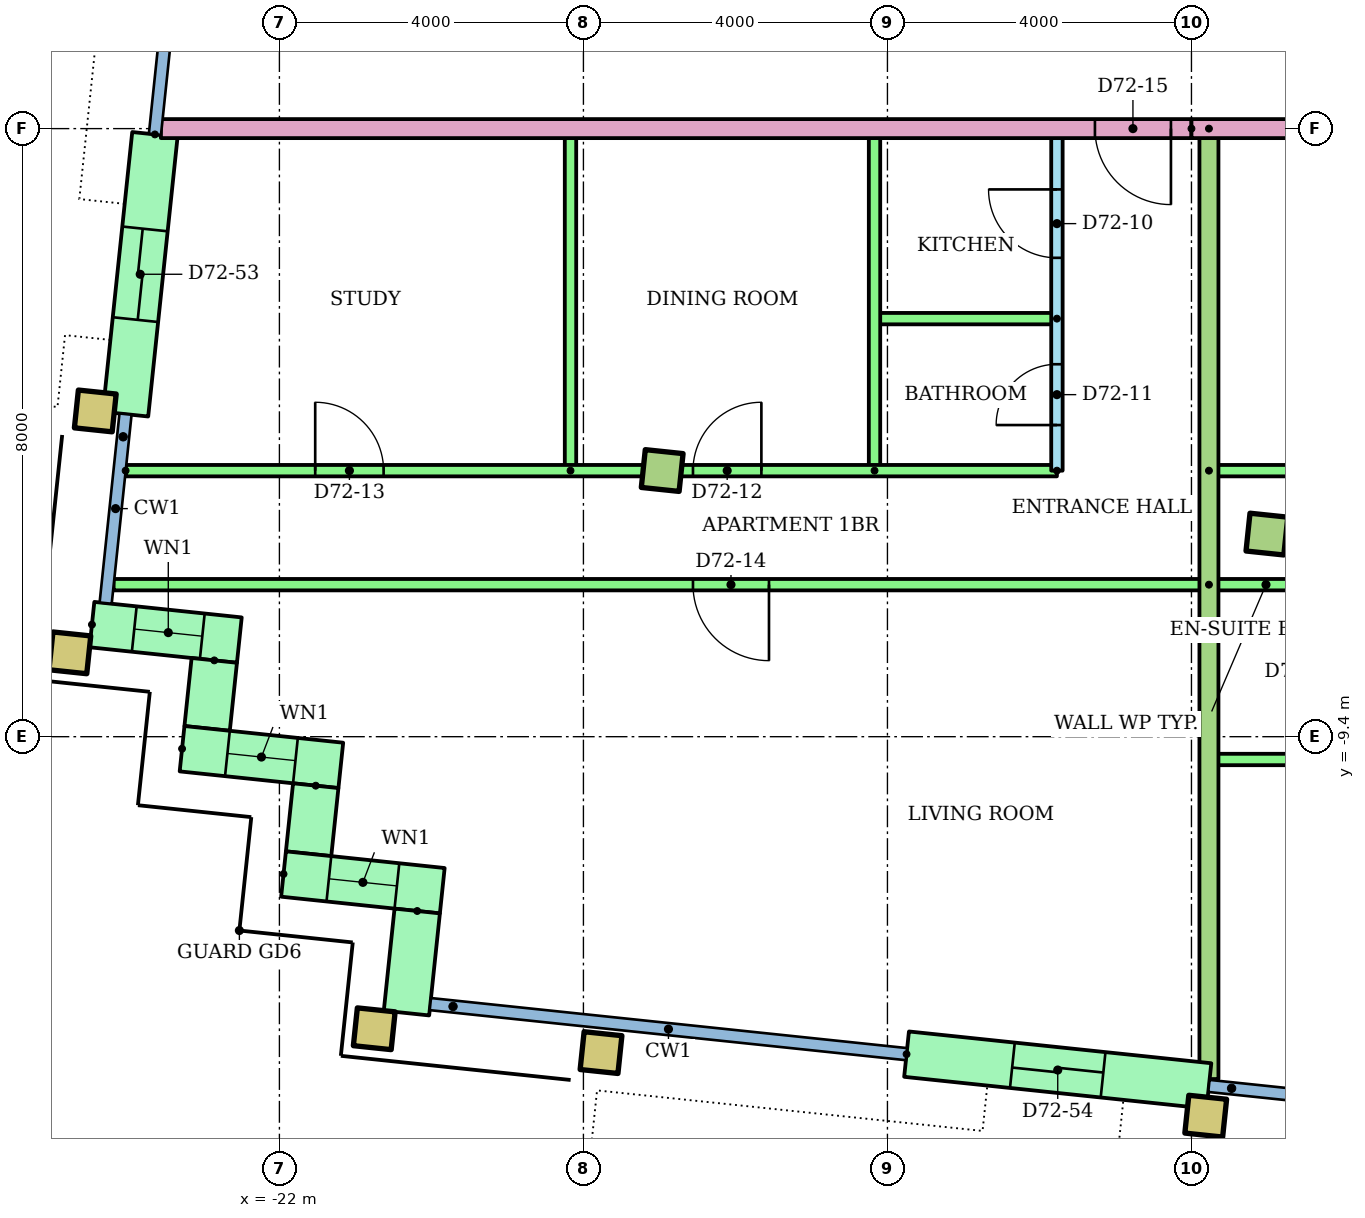
"""IFC4 building model, lengths in metres.
Left out: names, types, materials, properties, quantities, classifications, styles, units other than length and angle.
Written with IfcOpenShell. Run it as: python <this file> out.ifc"""

import sys

from ifc_helpers import new_model, si_unit, direction, frame, frame_2d, origin, origin_2d, place, context, subcontext, project, spatial, rectangle, hollow_rectangle, extrude, element, fill, save


model = new_model("IFC4")
c1 = context("Model", 3, precision=1e-05, world=origin(), true_north=direction((0.0, 1.0)))
c2 = subcontext(c1, "Body", "Model", "MODEL_VIEW")
j1 = project(units=[si_unit("LENGTHUNIT", "METRE"), si_unit("PLANEANGLEUNIT", "RADIAN")], contexts=[c1])
p1 = place(None, origin())
s1 = spatial("IfcSite", under=j1, at=p1, CompositionType="ELEMENT")
p2 = place(p1, origin())
s2 = spatial("IfcBuilding", under=s1, at=p2, CompositionType="ELEMENT")
p3 = place(p2, frame((0.0, 0.0, 275.5)))
s3 = spatial("IfcBuildingStorey", under=s2, at=p3, CompositionType="ELEMENT", Elevation=275.5)
for number, where, z_axis, x_axis in (
    (1, (-20.752, -13.243, 0.0), (0.0, 0.0, 1.0), (0.995, -0.105, 0.0)),
    (2, (-17.768, -13.556, 0.0), (0.0, 0.0, 1.0), (0.995, -0.105, 0.0)),
    (3, (-9.812, -14.392, 0.0), (0.0, 0.0, 1.0), (0.995, -0.105, 0.0)),
    (4, (-24.757, -8.297, 0.0), (0.0, 0.0, 1.0), (0.995, -0.105, 0.0)),
    (5, (-24.423, -5.115, 0.0), (0.0, 0.0, 1.0), (0.995, -0.105, 0.0)),
):
    element("IfcColumn", number, at=place(p3, frame(where, z_axis=z_axis, x_axis=x_axis)), inside=s3, PredefinedType="COLUMN", context=c2, shape_type="SweptSolid", body=[
        extrude(hollow_rectangle(XDim=0.5, YDim=0.5, WallThickness=0.025, at=origin_2d()), origin(), (0.0, 0.0, 1.0), 3.2),
    ])
for number, where, z_axis, x_axis in (
    (6, (-16.964, -5.898, 0.0), (0.0, 0.0, 1.0), (0.995, -0.105, 0.0)),
    (7, (-9.007, -6.735, 0.0), (0.0, 0.0, 1.0), (0.995, -0.105, 0.0)),
):
    element("IfcColumn", number, at=place(p3, frame(where, z_axis=z_axis, x_axis=x_axis)), inside=s3, PredefinedType="COLUMN", context=c2, shape_type="SweptSolid", body=[
        extrude(rectangle(XDim=0.5, YDim=0.5, at=origin_2d()), origin(), (0.0, 0.0, 1.0), 3.2),
    ])
p4 = place(p3, frame((-23.638, -1.476, 0.0), z_axis=(0.0, 0.0, 1.0), x_axis=(-0.104513052986, -0.994523514933, 0.0)))
e8 = element("IfcWall", 8, at=p4, inside=s3, PredefinedType="STANDARD", context=c2, shape_type="SweptSolid", body=[
    extrude(rectangle(XDim=3.7, YDim=0.6, at=frame_2d((1.85, 0.0))), origin(), (0.0, 0.0, 1.0), 2.92),
])
p5 = place(p4, frame((1.25, 0.0, 0.0)))
e9 = element("IfcOpeningElement", 9, at=p5, cuts=e8, PredefinedType="OPENING", context=c2, shape_type="SweptSolid", body=[
    extrude(rectangle(XDim=1.2, YDim=2.1, at=frame_2d((0.6, 1.05))), frame((0.0, 0.31, 0.0), z_axis=(0.0, -1.0, 0.0), x_axis=(1.0, 0.0, 0.0)), (0.0, 0.0, 1.0), 0.62),
])
p6 = place(p3, frame((-24.467, -7.925, 0.0), z_axis=(0.0, 0.0, 1.0), x_axis=(0.994521219184, -0.104534896528, 0.0)))
e10 = element("IfcWall", 10, at=p6, inside=s3, PredefinedType="STANDARD", context=c2, shape_type="SweptSolid", body=[
    extrude(rectangle(XDim=1.95, YDim=0.6, at=frame_2d((0.975, 0.0))), origin(), (0.0, 0.0, 1.0), 2.92),
])
p7 = place(p6, frame((0.56, 0.0, 0.9)))
e11 = element("IfcOpeningElement", 11, at=p7, cuts=e10, PredefinedType="OPENING", context=c2, shape_type="SweptSolid", body=[
    extrude(rectangle(XDim=0.9, YDim=1.5, at=frame_2d((0.45, 0.75))), frame((0.0, 0.31, 0.0), z_axis=(0.0, -1.0, 0.0), x_axis=(1.0, 0.0, 0.0)), (0.0, 0.0, 1.0), 0.62),
])
p8 = place(p3, frame((-22.857, -8.396, 0.0), z_axis=(0.0, 0.0, 1.0), x_axis=(-0.104444712852, -0.994530694326, 0.0)))
e12 = element("IfcWall", 12, at=p8, inside=s3, PredefinedType="STANDARD", context=c2, shape_type="SweptSolid", body=[
    extrude(rectangle(XDim=0.9, YDim=0.6, at=frame_2d((0.45, 0.0))), origin(), (0.0, 0.0, 1.0), 2.92),
])
p9 = place(p3, frame((-23.281, -9.558, 0.0), z_axis=(0.0, 0.0, 1.0), x_axis=(0.994523910136, -0.104509292252, 0.0)))
e13 = element("IfcWall", 13, at=p9, inside=s3, PredefinedType="STANDARD", context=c2, shape_type="SweptSolid", body=[
    extrude(rectangle(XDim=2.1, YDim=0.6, at=frame_2d((1.05, 0.0))), origin(), (0.0, 0.0, 1.0), 2.92),
])
p10 = place(p9, frame((0.6, 0.0, 0.9)))
e14 = element("IfcOpeningElement", 14, at=p10, cuts=e13, PredefinedType="OPENING", context=c2, shape_type="SweptSolid", body=[
    extrude(rectangle(XDim=0.9, YDim=1.5, at=frame_2d((0.45, 0.75))), frame((0.0, 0.31, 0.0), z_axis=(0.0, -1.0, 0.0), x_axis=(1.0, 0.0, 0.0)), (0.0, 0.0, 1.0), 0.62),
])
p11 = place(p3, frame((-21.522, -10.044, 0.0), z_axis=(0.0, 0.0, 1.0), x_axis=(-0.104416541099, -0.994533652495, 0.0)))
e15 = element("IfcWall", 15, at=p11, inside=s3, PredefinedType="STANDARD", context=c2, shape_type="SweptSolid", body=[
    extrude(rectangle(XDim=0.9, YDim=0.6, at=frame_2d((0.45, 0.0))), origin(), (0.0, 0.0, 1.0), 2.92),
])
p12 = place(p3, frame((-21.946, -11.207, 0.0), z_axis=(0.0, 0.0, 1.0), x_axis=(0.994511820899, -0.104624271047, 0.0)))
e16 = element("IfcWall", 16, at=p12, inside=s3, PredefinedType="STANDARD", context=c2, shape_type="SweptSolid", body=[
    extrude(rectangle(XDim=2.1, YDim=0.6, at=frame_2d((1.05, 0.0))), origin(), (0.0, 0.0, 1.0), 2.92),
])
p13 = place(p12, frame((0.6, 0.0, 0.9)))
e17 = element("IfcOpeningElement", 17, at=p13, cuts=e16, PredefinedType="OPENING", context=c2, shape_type="SweptSolid", body=[
    extrude(rectangle(XDim=0.9, YDim=1.5, at=frame_2d((0.45, 0.75))), frame((0.0, 0.31, 0.0), z_axis=(0.0, -1.0, 0.0), x_axis=(1.0, 0.0, 0.0)), (0.0, 0.0, 1.0), 0.62),
])
p14 = place(p3, frame((-20.187, -11.693, 0.0), z_axis=(0.0, 0.0, 1.0), x_axis=(-0.1043365026, -0.994542052517, 0.0)))
e18 = element("IfcWall", 18, at=p14, inside=s3, PredefinedType="STANDARD", context=c2, shape_type="SweptSolid", body=[
    extrude(rectangle(XDim=1.35, YDim=0.6, at=frame_2d((0.675, 0.0))), origin(), (0.0, 0.0, 1.0), 2.92),
])
p15 = place(p3, frame((-13.749, -13.576, 0.0), z_axis=(0.0, 0.0, 1.0), x_axis=(0.994519156568, -0.104554517933, 0.0)))
e19 = element("IfcWall", 19, at=p15, inside=s3, PredefinedType="STANDARD", context=c2, shape_type="SweptSolid", body=[
    extrude(rectangle(XDim=4.0, YDim=0.6, at=frame_2d((2.0, 0.0))), origin(), (0.0, 0.0, 1.0), 2.92),
])
p16 = place(p15, frame((1.4, 0.0, 0.0)))
e20 = element("IfcOpeningElement", 20, at=p16, cuts=e19, PredefinedType="OPENING", context=c2, shape_type="SweptSolid", body=[
    extrude(rectangle(XDim=1.2, YDim=2.1, at=frame_2d((0.6, 1.05))), frame((0.0, 0.31, 0.0), z_axis=(0.0, -1.0, 0.0), x_axis=(1.0, 0.0, 0.0)), (0.0, 0.0, 1.0), 0.62),
])
p17 = place(p3, frame((-11.77, -5.9, 0.0), z_axis=(0.0, 0.0, 1.0), x_axis=(0.0, 1.0, 0.0)))
e21 = element("IfcWall", 21, at=p17, inside=s3, PredefinedType="PARTITIONING", context=c2, shape_type="SweptSolid", body=[
    extrude(rectangle(XDim=4.5, YDim=0.15, at=frame_2d((2.25, 0.0))), origin(), (0.0, 0.0, 1.0), 2.4),
])
p18 = place(p17, frame((2.8, 0.0, 0.0)))
e22 = element("IfcOpeningElement", 22, at=p18, cuts=e21, PredefinedType="OPENING", context=c2, shape_type="SweptSolid", body=[
    extrude(rectangle(XDim=0.9, YDim=2.1, at=frame_2d((0.45, 1.05))), frame((0.0, 0.085, 0.0), z_axis=(0.0, -1.0, 0.0), x_axis=(1.0, 0.0, 0.0)), (0.0, 0.0, 1.0), 0.17),
])
p19 = place(p17, frame((0.6, 0.0, 0.0)))
e23 = element("IfcOpeningElement", 23, at=p19, cuts=e21, PredefinedType="OPENING", context=c2, shape_type="SweptSolid", body=[
    extrude(rectangle(XDim=0.8, YDim=2.1, at=frame_2d((0.4, 1.05))), frame((0.0, 0.085, 0.0), z_axis=(0.0, -1.0, 0.0), x_axis=(1.0, 0.0, 0.0)), (0.0, 0.0, 1.0), 0.17),
])
p20 = place(p3, frame((-11.77, -3.9, 0.0), z_axis=(0.0, 0.0, 1.0), x_axis=(-1.0, 0.0, 0.0)))
e24 = element("IfcWall", 24, at=p20, inside=s3, PredefinedType="PARTITIONING", context=c2, shape_type="SweptSolid", body=[
    extrude(rectangle(XDim=2.4, YDim=0.15, at=frame_2d((1.2, 0.0))), origin(), (0.0, 0.0, 1.0), 2.4),
])
for number, where, z_axis, x_axis in (
    (25, (-14.17, -5.9, 0.0), (0.0, 0.0, 1.0), (0.0, 1.0, 0.0)),
    (26, (-18.17, -5.9, 0.0), (0.0, 0.0, 1.0), (0.0, 1.0, 0.0)),
):
    element("IfcWall", number, at=place(p3, frame(where, z_axis=z_axis, x_axis=x_axis)), inside=s3, PredefinedType="PARTITIONING", context=c2, shape_type="SweptSolid", body=[
        extrude(rectangle(XDim=4.5, YDim=0.15, at=frame_2d((2.25, 0.0))), origin(), (0.0, 0.0, 1.0), 2.4),
    ])
p21 = place(p3, frame((-24.023, -5.9, 0.0)))
e27 = element("IfcWall", 27, at=p21, inside=s3, PredefinedType="PARTITIONING", context=c2, shape_type="SweptSolid", body=[
    extrude(rectangle(XDim=12.253, YDim=0.15, at=frame_2d((6.127, 0.0))), origin(), (0.0, 0.0, 1.0), 2.4),
])
p22 = place(p21, frame((7.465, 0.0, 0.0)))
e28 = element("IfcOpeningElement", 28, at=p22, cuts=e27, PredefinedType="OPENING", context=c2, shape_type="SweptSolid", body=[
    extrude(rectangle(XDim=0.9, YDim=2.1, at=frame_2d((0.45, 1.05))), frame((0.0, 0.085, 0.0), z_axis=(0.0, -1.0, 0.0), x_axis=(1.0, 0.0, 0.0)), (0.0, 0.0, 1.0), 0.17),
])
p23 = place(p21, frame((2.494, 0.0, 0.0)))
e29 = element("IfcOpeningElement", 29, at=p23, cuts=e27, PredefinedType="OPENING", context=c2, shape_type="SweptSolid", body=[
    extrude(rectangle(XDim=0.9, YDim=2.1, at=frame_2d((0.45, 1.05))), frame((0.0, 0.085, 0.0), z_axis=(0.0, -1.0, 0.0), x_axis=(1.0, 0.0, 0.0)), (0.0, 0.0, 1.0), 0.17),
])
p24 = place(p3, frame((-9.77, -7.4, 0.0), z_axis=(0.0, 0.0, 1.0), x_axis=(-1.0, 0.0, 0.0)))
e30 = element("IfcWall", 30, at=p24, inside=s3, PredefinedType="PARTITIONING", context=c2, shape_type="SweptSolid", body=[
    extrude(rectangle(XDim=14.411, YDim=0.15, at=frame_2d((7.206, 0.0))), origin(), (0.0, 0.0, 1.0), 2.4),
])
p25 = place(p24, frame((5.789, 0.0, 0.0)))
e31 = element("IfcOpeningElement", 31, at=p25, cuts=e30, PredefinedType="OPENING", context=c2, shape_type="SweptSolid", body=[
    extrude(rectangle(XDim=1.0, YDim=2.1, at=frame_2d((0.5, 1.05))), frame((0.0, 0.085, 0.0), z_axis=(0.0, -1.0, 0.0), x_axis=(1.0, 0.0, 0.0)), (0.0, 0.0, 1.0), 0.17),
])
p26 = place(p3, frame((-9.77, -5.9, 0.0)))
e32 = element("IfcWall", 32, at=p26, inside=s3, PredefinedType="PARTITIONING", context=c2, shape_type="SweptSolid", body=[
    extrude(rectangle(XDim=13.912, YDim=0.15, at=frame_2d((6.956, 0.0))), origin(), (0.0, 0.0, 1.0), 2.4),
])
p27 = place(p26, frame((9.562, 0.0, 0.0)))
e33 = element("IfcOpeningElement", 33, at=p27, cuts=e32, PredefinedType="OPENING", context=c2, shape_type="SweptSolid", body=[
    extrude(rectangle(XDim=0.9, YDim=2.1, at=frame_2d((0.45, 1.05))), frame((0.0, 0.085, 0.0), z_axis=(0.0, -1.0, 0.0), x_axis=(1.0, 0.0, 0.0)), (0.0, 0.0, 1.0), 0.17),
])
p28 = place(p26, frame((6.187, 0.0, 0.0)))
e34 = element("IfcOpeningElement", 34, at=p28, cuts=e32, PredefinedType="OPENING", context=c2, shape_type="SweptSolid", body=[
    extrude(rectangle(XDim=0.9, YDim=2.1, at=frame_2d((0.45, 1.05))), frame((0.0, 0.085, 0.0), z_axis=(0.0, -1.0, 0.0), x_axis=(1.0, 0.0, 0.0)), (0.0, 0.0, 1.0), 0.17),
])
p29 = place(p26, frame((1.931, 0.0, 0.0)))
e35 = element("IfcOpeningElement", 35, at=p29, cuts=e32, PredefinedType="OPENING", context=c2, shape_type="SweptSolid", body=[
    extrude(rectangle(XDim=0.9, YDim=2.1, at=frame_2d((0.45, 1.05))), frame((0.0, 0.085, 0.0), z_axis=(0.0, -1.0, 0.0), x_axis=(1.0, 0.0, 0.0)), (0.0, 0.0, 1.0), 0.17),
])
p30 = place(p3, frame((6.142, -7.4, 0.0), z_axis=(0.0, 0.0, 1.0), x_axis=(-1.0, 0.0, 0.0)))
e36 = element("IfcWall", 36, at=p30, inside=s3, PredefinedType="PARTITIONING", context=c2, shape_type="SweptSolid", body=[
    extrude(rectangle(XDim=15.912, YDim=0.15, at=frame_2d((7.956, 0.0))), origin(), (0.0, 0.0, 1.0), 2.4),
])
p31 = place(p30, frame((12.252, 0.0, 0.0)))
e37 = element("IfcOpeningElement", 37, at=p31, cuts=e36, PredefinedType="OPENING", context=c2, shape_type="SweptSolid", body=[
    extrude(rectangle(XDim=0.9, YDim=2.1, at=frame_2d((0.45, 1.05))), frame((0.0, 0.085, 0.0), z_axis=(0.0, -1.0, 0.0), x_axis=(1.0, 0.0, 0.0)), (0.0, 0.0, 1.0), 0.17),
])
p32 = place(p30, frame((9.495, 0.0, 0.0)))
e38 = element("IfcOpeningElement", 38, at=p32, cuts=e36, PredefinedType="OPENING", context=c2, shape_type="SweptSolid", body=[
    extrude(rectangle(XDim=0.9, YDim=2.1, at=frame_2d((0.45, 1.05))), frame((0.0, 0.085, 0.0), z_axis=(0.0, -1.0, 0.0), x_axis=(1.0, 0.0, 0.0)), (0.0, 0.0, 1.0), 0.17),
])
p33 = place(p30, frame((3.478, 0.0, 0.0)))
e39 = element("IfcOpeningElement", 39, at=p33, cuts=e36, PredefinedType="OPENING", context=c2, shape_type="SweptSolid", body=[
    extrude(rectangle(XDim=1.0, YDim=2.1, at=frame_2d((0.5, 1.05))), frame((0.0, 0.085, 0.0), z_axis=(0.0, -1.0, 0.0), x_axis=(1.0, 0.0, 0.0)), (0.0, 0.0, 1.0), 0.17),
])
p34 = place(p3, frame((-7.77, -9.7, 0.0), z_axis=(0.0, 0.0, 1.0), x_axis=(-1.0, 0.0, 0.0)))
e40 = element("IfcWall", 40, at=p34, inside=s3, PredefinedType="PARTITIONING", context=c2, shape_type="SweptSolid", body=[
    extrude(rectangle(XDim=2.0, YDim=0.15, at=frame_2d((1.0, 0.0))), origin(), (0.0, 0.0, 1.0), 2.4),
])
p35 = place(p3, frame((-9.77, -1.4, 0.0), z_axis=(0.0, 0.0, 1.0), x_axis=(0.0, -1.0, 0.0)))
e41 = element("IfcWall", 41, at=p35, inside=s3, PredefinedType="PARTITIONING", context=c2, shape_type="SweptSolid", body=[
    extrude(rectangle(XDim=12.504, YDim=0.25, at=frame_2d((6.252, 0.0))), origin(), (0.0, 0.0, 1.0), 2.4),
])
p36 = place(p3, frame((-10.0, -1.4, 0.0), z_axis=(0.0, 0.0, 1.0), x_axis=(-1.0, 0.0, 0.0)))
e42 = element("IfcWall", 42, at=p36, inside=s3, PredefinedType="PARTITIONING", context=c2, shape_type="SweptSolid", body=[
    extrude(rectangle(XDim=13.56, YDim=0.25, at=frame_2d((6.78, 0.0))), origin(), (0.0, 0.0, 1.0), 2.4),
])
p37 = place(p36, frame((0.27, 0.0, 0.0)))
e43 = element("IfcOpeningElement", 43, at=p37, cuts=e42, PredefinedType="OPENING", context=c2, shape_type="SweptSolid", body=[
    extrude(rectangle(XDim=1.0, YDim=2.1, at=frame_2d((0.5, 1.05))), frame((0.0, 0.135, 0.0), z_axis=(0.0, -1.0, 0.0), x_axis=(1.0, 0.0, 0.0)), (0.0, 0.0, 1.0), 0.27),
])
p38 = place(p3, frame((10.0, -1.4, 0.0), z_axis=(0.0, 0.0, 1.0), x_axis=(-1.0, 0.0, 0.0)))
e44 = element("IfcWall", 44, at=p38, inside=s3, PredefinedType="PARTITIONING", context=c2, shape_type="SweptSolid", body=[
    extrude(rectangle(XDim=20.0, YDim=0.25, at=frame_2d((10.0, 0.0))), origin(), (0.0, 0.0, 1.0), 2.4),
])
p39 = place(p38, frame((4.358, 0.0, 0.0)))
e45 = element("IfcOpeningElement", 45, at=p39, cuts=e44, PredefinedType="OPENING", context=c2, shape_type="SweptSolid", body=[
    extrude(rectangle(XDim=1.0, YDim=2.1, at=frame_2d((0.5, 1.05))), frame((0.0, 0.135, 0.0), z_axis=(0.0, -1.0, 0.0), x_axis=(1.0, 0.0, 0.0)), (0.0, 0.0, 1.0), 0.27),
])
p40 = place(p38, frame((2.614, 0.0, 0.0)))
e46 = element("IfcOpeningElement", 46, at=p40, cuts=e44, PredefinedType="OPENING", context=c2, shape_type="SweptSolid", body=[
    extrude(rectangle(XDim=0.9, YDim=2.1, at=frame_2d((0.45, 1.05))), frame((0.0, 0.135, 0.0), z_axis=(0.0, -1.0, 0.0), x_axis=(1.0, 0.0, 0.0)), (0.0, 0.0, 1.0), 0.27),
])
p41 = place(p7, origin())
e47 = element("IfcWindow", 47, at=p41, inside=s3, PartitioningType="SINGLE_PANEL", PredefinedType="WINDOW", context=c2, shape_type="SweptSolid", body=[
    extrude(rectangle(XDim=0.9, YDim=1.5, at=frame_2d((0.45, 0.75))), frame((0.0, 0.03, 0.0), z_axis=(0.0, -1.0, 0.0), x_axis=(1.0, 0.0, 0.0)), (0.0, 0.0, 1.0), 0.06),
])
fill(e11, e47)
p42 = place(p10, origin())
e48 = element("IfcWindow", 48, at=p42, inside=s3, PartitioningType="SINGLE_PANEL", PredefinedType="WINDOW", context=c2, shape_type="SweptSolid", body=[
    extrude(rectangle(XDim=0.9, YDim=1.5, at=frame_2d((0.45, 0.75))), frame((0.0, 0.03, 0.0), z_axis=(0.0, -1.0, 0.0), x_axis=(1.0, 0.0, 0.0)), (0.0, 0.0, 1.0), 0.06),
])
fill(e14, e48)
p43 = place(p13, origin())
e49 = element("IfcWindow", 49, at=p43, inside=s3, PartitioningType="SINGLE_PANEL", PredefinedType="WINDOW", context=c2, shape_type="SweptSolid", body=[
    extrude(rectangle(XDim=0.9, YDim=1.5, at=frame_2d((0.45, 0.75))), frame((0.0, 0.03, 0.0), z_axis=(0.0, -1.0, 0.0), x_axis=(1.0, 0.0, 0.0)), (0.0, 0.0, 1.0), 0.06),
])
fill(e17, e49)
p44 = place(p18, origin())
e50 = element("IfcDoor", 50, at=p44, inside=s3, OperationType="SINGLE_SWING_RIGHT", PredefinedType="DOOR", context=c2, shape_type="SweptSolid", body=[
    extrude(rectangle(XDim=0.9, YDim=2.1, at=frame_2d((0.45, 1.05))), frame((0.0, 0.025, 0.0), z_axis=(0.0, -1.0, 0.0), x_axis=(1.0, 0.0, 0.0)), (0.0, 0.0, 1.0), 0.05),
])
fill(e22, e50)
p45 = place(p19, origin())
e51 = element("IfcDoor", 51, at=p45, inside=s3, OperationType="SINGLE_SWING_LEFT", PredefinedType="DOOR", context=c2, shape_type="SweptSolid", body=[
    extrude(rectangle(XDim=0.8, YDim=2.1, at=frame_2d((0.4, 1.05))), frame((0.0, 0.025, 0.0), z_axis=(0.0, -1.0, 0.0), x_axis=(1.0, 0.0, 0.0)), (0.0, 0.0, 1.0), 0.05),
])
fill(e23, e51)
p46 = place(p22, origin())
e52 = element("IfcDoor", 52, at=p46, inside=s3, OperationType="SINGLE_SWING_RIGHT", PredefinedType="DOOR", context=c2, shape_type="SweptSolid", body=[
    extrude(rectangle(XDim=0.9, YDim=2.1, at=frame_2d((0.45, 1.05))), frame((0.0, 0.025, 0.0), z_axis=(0.0, -1.0, 0.0), x_axis=(1.0, 0.0, 0.0)), (0.0, 0.0, 1.0), 0.05),
])
fill(e28, e52)
p47 = place(p23, origin())
e53 = element("IfcDoor", 53, at=p47, inside=s3, OperationType="SINGLE_SWING_LEFT", PredefinedType="DOOR", context=c2, shape_type="SweptSolid", body=[
    extrude(rectangle(XDim=0.9, YDim=2.1, at=frame_2d((0.45, 1.05))), frame((0.0, 0.025, 0.0), z_axis=(0.0, -1.0, 0.0), x_axis=(1.0, 0.0, 0.0)), (0.0, 0.0, 1.0), 0.05),
])
fill(e29, e53)
p48 = place(p25, origin())
e54 = element("IfcDoor", 54, at=p48, inside=s3, OperationType="SINGLE_SWING_LEFT", PredefinedType="DOOR", context=c2, shape_type="SweptSolid", body=[
    extrude(rectangle(XDim=1.0, YDim=2.1, at=frame_2d((0.5, 1.05))), frame((0.0, 0.025, 0.0), z_axis=(0.0, -1.0, 0.0), x_axis=(1.0, 0.0, 0.0)), (0.0, 0.0, 1.0), 0.05),
])
fill(e31, e54)
p49 = place(p37, origin())
e55 = element("IfcDoor", 55, at=p49, inside=s3, OperationType="SINGLE_SWING_LEFT", PredefinedType="DOOR", context=c2, shape_type="SweptSolid", body=[
    extrude(rectangle(XDim=1.0, YDim=2.1, at=frame_2d((0.5, 1.05))), frame((0.0, 0.025, 0.0), z_axis=(0.0, -1.0, 0.0), x_axis=(1.0, 0.0, 0.0)), (0.0, 0.0, 1.0), 0.05),
])
fill(e43, e55)
p50 = place(p5, origin())
e56 = element("IfcDoor", 56, at=p50, inside=s3, OperationType="SLIDING_TO_LEFT", PredefinedType="DOOR", context=c2, shape_type="SweptSolid", body=[
    extrude(rectangle(XDim=1.2, YDim=2.1, at=frame_2d((0.6, 1.05))), frame((0.0, 0.025, 0.0), z_axis=(0.0, -1.0, 0.0), x_axis=(1.0, 0.0, 0.0)), (0.0, 0.0, 1.0), 0.05),
])
fill(e9, e56)
p51 = place(p16, origin())
e57 = element("IfcDoor", 57, at=p51, inside=s3, OperationType="SLIDING_TO_LEFT", PredefinedType="DOOR", context=c2, shape_type="SweptSolid", body=[
    extrude(rectangle(XDim=1.2, YDim=2.1, at=frame_2d((0.6, 1.05))), frame((0.0, 0.025, 0.0), z_axis=(0.0, -1.0, 0.0), x_axis=(1.0, 0.0, 0.0)), (0.0, 0.0, 1.0), 0.05),
])
fill(e20, e57)
save(model, sys.argv[1])
